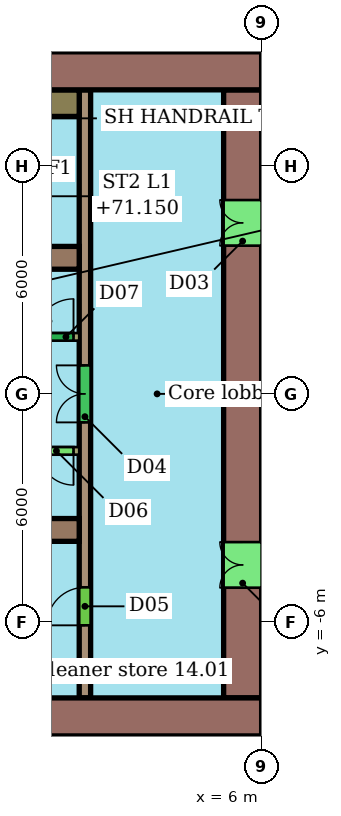
"""IFC4 building model, lengths in metres.
Left out: names, types, materials, properties, quantities, classifications, styles, units other than length and angle.
Written with IfcOpenShell. Run it as: python <this file> out.ifc"""

import sys

from ifc_helpers import new_model, si_unit, direction, frame, frame_2d, origin, place, context, subcontext, project, spatial, rectangle, extrude, element, fill, save


model = new_model("IFC4")
c1 = context("Model", 3, precision=1e-05, world=origin(), true_north=direction((0.0, 1.0)))
c2 = subcontext(c1, "Body", "Model", "MODEL_VIEW")
j1 = project(units=[si_unit("LENGTHUNIT", "METRE"), si_unit("PLANEANGLEUNIT", "RADIAN")], contexts=[c1])
p1 = place(None, origin())
s1 = spatial("IfcSite", under=j1, at=p1, CompositionType="ELEMENT")
p2 = place(p1, origin())
s2 = spatial("IfcBuilding", under=s1, at=p2, CompositionType="ELEMENT")
p3 = place(p2, frame((0.0, 0.0, 69.3)))
s3 = spatial("IfcBuildingStorey", under=s2, at=p3, CompositionType="ELEMENT", Elevation=69.3)
p4 = place(p3, frame((6.0, 8.5, 0.0), z_axis=(0.0, 0.0, 1.0), x_axis=(-1.0, 0.0, 0.0)))
e1 = element("IfcWall", 1, at=p4, inside=s3, PredefinedType="SHEAR", context=c2, shape_type="SweptSolid", body=[
    extrude(rectangle(XDim=12.0, YDim=1.0, at=frame_2d((6.0, 0.0))), origin(), (0.0, 0.0, 1.0), 3.4),
])
p5 = place(p4, frame((5.6, 0.0, 0.0)))
e2 = element("IfcOpeningElement", 2, at=p5, cuts=e1, PredefinedType="OPENING", context=c2, shape_type="SweptSolid", body=[
    extrude(rectangle(XDim=1.2, YDim=2.1, at=frame_2d((0.6, 1.05))), frame((0.0, 0.51, 0.0), z_axis=(0.0, -1.0, 0.0), x_axis=(1.0, 0.0, 0.0)), (0.0, 0.0, 1.0), 1.02),
])
p6 = place(p3, frame((-18.0, -8.5, 0.0), z_axis=(0.0, 0.0, 1.0), x_axis=(1.0, 0.0, 0.0)))
e3 = element("IfcWall", 3, at=p6, inside=s3, PredefinedType="SHEAR", context=c2, shape_type="SweptSolid", body=[
    extrude(rectangle(XDim=24.0, YDim=1.0, at=frame_2d((12.0, 0.0))), origin(), (0.0, 0.0, 1.0), 3.4),
])
p7 = place(p6, frame((6.0, 0.0, 0.0)))
e4 = element("IfcOpeningElement", 4, at=p7, cuts=e3, PredefinedType="OPENING", context=c2, shape_type="SweptSolid", body=[
    extrude(rectangle(XDim=1.2, YDim=2.1, at=frame_2d((0.6, 1.05))), frame((0.0, 0.51, 0.0), z_axis=(0.0, -1.0, 0.0), x_axis=(1.0, 0.0, 0.0)), (0.0, 0.0, 1.0), 1.02),
])
p8 = place(p3, frame((5.5, -8.0, 0.0), z_axis=(0.0, 0.0, 1.0), x_axis=(0.0, 1.0, 0.0)))
e5 = element("IfcWall", 5, at=p8, inside=s3, PredefinedType="SHEAR", context=c2, shape_type="SweptSolid", body=[
    extrude(rectangle(XDim=16.0, YDim=1.0, at=frame_2d((8.0, 0.0))), origin(), (0.0, 0.0, 1.0), 3.4),
])
p9 = place(p8, frame((2.9, 0.0, 0.0)))
e6 = element("IfcOpeningElement", 6, at=p9, cuts=e5, PredefinedType="OPENING", context=c2, shape_type="SweptSolid", body=[
    extrude(rectangle(XDim=1.2, YDim=2.1, at=frame_2d((0.6, 1.05))), frame((0.0, 0.51, 0.0), z_axis=(0.0, -1.0, 0.0), x_axis=(1.0, 0.0, 0.0)), (0.0, 0.0, 1.0), 1.02),
])
p10 = place(p8, frame((11.9, 0.0, 0.0)))
e7 = element("IfcOpeningElement", 7, at=p10, cuts=e5, PredefinedType="OPENING", context=c2, shape_type="SweptSolid", body=[
    extrude(rectangle(XDim=1.2, YDim=2.1, at=frame_2d((0.6, 1.05))), frame((0.0, 0.51, 0.0), z_axis=(0.0, -1.0, 0.0), x_axis=(1.0, 0.0, 0.0)), (0.0, 0.0, 1.0), 1.02),
])
for number, where, z_axis, x_axis in (
    (8, (-6.0, 3.58, 0.0), (0.0, 0.0, 1.0), (1.0, 0.0, 0.0)),
    (9, (-6.0, -3.58, 0.0), (0.0, 0.0, 1.0), (1.0, 0.0, 0.0)),
):
    element("IfcWall", number, at=place(p3, frame(where, z_axis=z_axis, x_axis=x_axis)), inside=s3, PredefinedType="SHEAR", context=c2, shape_type="SweptSolid", body=[
        extrude(rectangle(XDim=7.2, YDim=0.6, at=frame_2d((3.6, 0.0))), origin(), (0.0, 0.0, 1.0), 3.4),
    ])
p11 = place(p3, frame((1.35, -8.0, 0.0), z_axis=(0.0, 0.0, 1.0), x_axis=(0.0, 1.0, 0.0)))
e10 = element("IfcWall", 10, at=p11, inside=s3, PredefinedType="SHEAR", context=c2, shape_type="SweptSolid", body=[
    extrude(rectangle(XDim=16.0, YDim=0.3, at=frame_2d((8.0, 0.0))), origin(), (0.0, 0.0, 1.0), 3.4),
])
p12 = place(p11, frame((1.91, 0.0, 0.0)))
e11 = element("IfcOpeningElement", 11, at=p12, cuts=e10, PredefinedType="OPENING", context=c2, shape_type="SweptSolid", body=[
    extrude(rectangle(XDim=1.0, YDim=2.1, at=frame_2d((0.5, 1.05))), frame((0.0, 0.16, 0.0), z_axis=(0.0, -1.0, 0.0), x_axis=(1.0, 0.0, 0.0)), (0.0, 0.0, 1.0), 0.32),
])
p13 = place(p11, frame((7.25, 0.0, 0.0)))
e12 = element("IfcOpeningElement", 12, at=p13, cuts=e10, PredefinedType="OPENING", context=c2, shape_type="SweptSolid", body=[
    extrude(rectangle(XDim=1.5, YDim=2.1, at=frame_2d((0.75, 1.05))), frame((0.0, 0.16, 0.0), z_axis=(0.0, -1.0, 0.0), x_axis=(1.0, 0.0, 0.0)), (0.0, 0.0, 1.0), 0.32),
])
p14 = place(p3, frame((-13.2, 1.5, 0.0), z_axis=(0.0, 0.0, 1.0), x_axis=(1.0, 0.0, 0.0)))
e13 = element("IfcWall", 13, at=p14, inside=s3, PredefinedType="SHEAR", context=c2, shape_type="SweptSolid", body=[
    extrude(rectangle(XDim=14.4, YDim=0.2, at=frame_2d((7.2, 0.0))), origin(), (0.0, 0.0, 1.0), 3.4),
])
p15 = place(p14, frame((0.546, 0.0, 0.0)))
e14 = element("IfcOpeningElement", 14, at=p15, cuts=e13, PredefinedType="OPENING", context=c2, shape_type="SweptSolid", body=[
    extrude(rectangle(XDim=1.1, YDim=2.1, at=frame_2d((0.55, 1.05))), frame((0.0, 0.11, 0.0), z_axis=(0.0, -1.0, 0.0), x_axis=(1.0, 0.0, 0.0)), (0.0, 0.0, 1.0), 0.22),
])
p16 = place(p14, frame((2.988, 0.0, 0.0)))
e15 = element("IfcOpeningElement", 15, at=p16, cuts=e13, PredefinedType="OPENING", context=c2, shape_type="SweptSolid", body=[
    extrude(rectangle(XDim=1.1, YDim=2.1, at=frame_2d((0.55, 1.05))), frame((0.0, 0.11, 0.0), z_axis=(0.0, -1.0, 0.0), x_axis=(1.0, 0.0, 0.0)), (0.0, 0.0, 1.0), 0.22),
])
p17 = place(p14, frame((5.429, 0.0, 0.0)))
e16 = element("IfcOpeningElement", 16, at=p17, cuts=e13, PredefinedType="OPENING", context=c2, shape_type="SweptSolid", body=[
    extrude(rectangle(XDim=1.1, YDim=2.1, at=frame_2d((0.55, 1.05))), frame((0.0, 0.11, 0.0), z_axis=(0.0, -1.0, 0.0), x_axis=(1.0, 0.0, 0.0)), (0.0, 0.0, 1.0), 0.22),
])
p18 = place(p14, frame((7.871, 0.0, 0.0)))
e17 = element("IfcOpeningElement", 17, at=p18, cuts=e13, PredefinedType="OPENING", context=c2, shape_type="SweptSolid", body=[
    extrude(rectangle(XDim=1.1, YDim=2.1, at=frame_2d((0.55, 1.05))), frame((0.0, 0.11, 0.0), z_axis=(0.0, -1.0, 0.0), x_axis=(1.0, 0.0, 0.0)), (0.0, 0.0, 1.0), 0.22),
])
p19 = place(p14, frame((11.607, 0.0, 0.0)))
e18 = element("IfcOpeningElement", 18, at=p19, cuts=e13, PredefinedType="OPENING", context=c2, shape_type="SweptSolid", body=[
    extrude(rectangle(XDim=0.9, YDim=2.1, at=frame_2d((0.45, 1.05))), frame((0.0, 0.11, 0.0), z_axis=(0.0, -1.0, 0.0), x_axis=(1.0, 0.0, 0.0)), (0.0, 0.0, 1.0), 0.22),
])
p20 = place(p14, frame((13.25, 0.0, 0.0)))
e19 = element("IfcOpeningElement", 19, at=p20, cuts=e13, PredefinedType="OPENING", context=c2, shape_type="SweptSolid", body=[
    extrude(rectangle(XDim=1.0, YDim=2.1, at=frame_2d((0.5, 1.05))), frame((0.0, 0.11, 0.0), z_axis=(0.0, -1.0, 0.0), x_axis=(1.0, 0.0, 0.0)), (0.0, 0.0, 1.0), 0.22),
])
p21 = place(p3, frame((1.2, -1.5, 0.0), z_axis=(0.0, 0.0, 1.0), x_axis=(-1.0, 0.0, 0.0)))
e20 = element("IfcWall", 20, at=p21, inside=s3, PredefinedType="SHEAR", context=c2, shape_type="SweptSolid", body=[
    extrude(rectangle(XDim=14.4, YDim=0.2, at=frame_2d((7.2, 0.0))), origin(), (0.0, 0.0, 1.0), 3.4),
])
p22 = place(p21, frame((7.821, 0.0, 0.0)))
e21 = element("IfcOpeningElement", 21, at=p22, cuts=e20, PredefinedType="OPENING", context=c2, shape_type="SweptSolid", body=[
    extrude(rectangle(XDim=1.2, YDim=2.1, at=frame_2d((0.6, 1.05))), frame((0.0, 0.11, 0.0), z_axis=(0.0, -1.0, 0.0), x_axis=(1.0, 0.0, 0.0)), (0.0, 0.0, 1.0), 0.22),
])
p23 = place(p21, frame((0.15, 0.0, 0.0)))
e22 = element("IfcOpeningElement", 22, at=p23, cuts=e20, PredefinedType="OPENING", context=c2, shape_type="SweptSolid", body=[
    extrude(rectangle(XDim=0.9, YDim=2.1, at=frame_2d((0.45, 1.05))), frame((0.0, 0.11, 0.0), z_axis=(0.0, -1.0, 0.0), x_axis=(1.0, 0.0, 0.0)), (0.0, 0.0, 1.0), 0.22),
])
p24 = place(p3, frame((0.4, 7.65, 0.0), z_axis=(0.0, 0.0, 1.0), x_axis=(1.0, 0.0, 0.0)))
e23 = element("IfcWall", 23, at=p24, inside=s3, PredefinedType="SHEAR", context=c2, shape_type="SweptSolid", body=[
    extrude(rectangle(XDim=0.8, YDim=0.7, at=frame_2d((0.4, 0.0))), origin(), (0.0, 0.0, 1.0), 3.4),
])
p25 = place(p9, origin())
e24 = element("IfcDoor", 24, at=p25, inside=s3, OperationType="DOUBLE_DOOR_SINGLE_SWING", PredefinedType="NOTDEFINED", context=c2, shape_type="SweptSolid", body=[
    extrude(rectangle(XDim=1.2, YDim=2.1, at=frame_2d((0.6, 1.05))), frame((0.0, 0.025, 0.0), z_axis=(0.0, -1.0, 0.0), x_axis=(1.0, 0.0, 0.0)), (0.0, 0.0, 1.0), 0.05),
])
fill(e6, e24)
p26 = place(p10, origin())
e25 = element("IfcDoor", 25, at=p26, inside=s3, OperationType="DOUBLE_DOOR_SINGLE_SWING", PredefinedType="NOTDEFINED", context=c2, shape_type="SweptSolid", body=[
    extrude(rectangle(XDim=1.2, YDim=2.1, at=frame_2d((0.6, 1.05))), frame((0.0, 0.025, 0.0), z_axis=(0.0, -1.0, 0.0), x_axis=(1.0, 0.0, 0.0)), (0.0, 0.0, 1.0), 0.05),
])
fill(e7, e25)
p27 = place(p12, origin())
e26 = element("IfcDoor", 26, at=p27, inside=s3, OperationType="SINGLE_SWING_LEFT", PredefinedType="NOTDEFINED", context=c2, shape_type="SweptSolid", body=[
    extrude(rectangle(XDim=1.0, YDim=2.1, at=frame_2d((0.5, 1.05))), frame((0.0, 0.025, 0.0), z_axis=(0.0, -1.0, 0.0), x_axis=(1.0, 0.0, 0.0)), (0.0, 0.0, 1.0), 0.05),
])
fill(e11, e26)
p28 = place(p13, origin())
e27 = element("IfcDoor", 27, at=p28, inside=s3, OperationType="DOUBLE_DOOR_SINGLE_SWING", PredefinedType="NOTDEFINED", context=c2, shape_type="SweptSolid", body=[
    extrude(rectangle(XDim=1.5, YDim=2.1, at=frame_2d((0.75, 1.05))), frame((0.0, 0.025, 0.0), z_axis=(0.0, -1.0, 0.0), x_axis=(1.0, 0.0, 0.0)), (0.0, 0.0, 1.0), 0.05),
])
fill(e12, e27)
p29 = place(p20, origin())
e28 = element("IfcDoor", 28, at=p29, inside=s3, OperationType="SINGLE_SWING_RIGHT", PredefinedType="NOTDEFINED", context=c2, shape_type="SweptSolid", body=[
    extrude(rectangle(XDim=1.0, YDim=2.1, at=frame_2d((0.5, 1.05))), frame((0.0, 0.025, 0.0), z_axis=(0.0, -1.0, 0.0), x_axis=(1.0, 0.0, 0.0)), (0.0, 0.0, 1.0), 0.05),
])
fill(e19, e28)
p30 = place(p23, origin())
e29 = element("IfcDoor", 29, at=p30, inside=s3, OperationType="SINGLE_SWING_LEFT", PredefinedType="NOTDEFINED", context=c2, shape_type="SweptSolid", body=[
    extrude(rectangle(XDim=0.9, YDim=2.1, at=frame_2d((0.45, 1.05))), frame((0.0, 0.025, 0.0), z_axis=(0.0, -1.0, 0.0), x_axis=(1.0, 0.0, 0.0)), (0.0, 0.0, 1.0), 0.05),
])
fill(e22, e29)
save(model, sys.argv[1])
